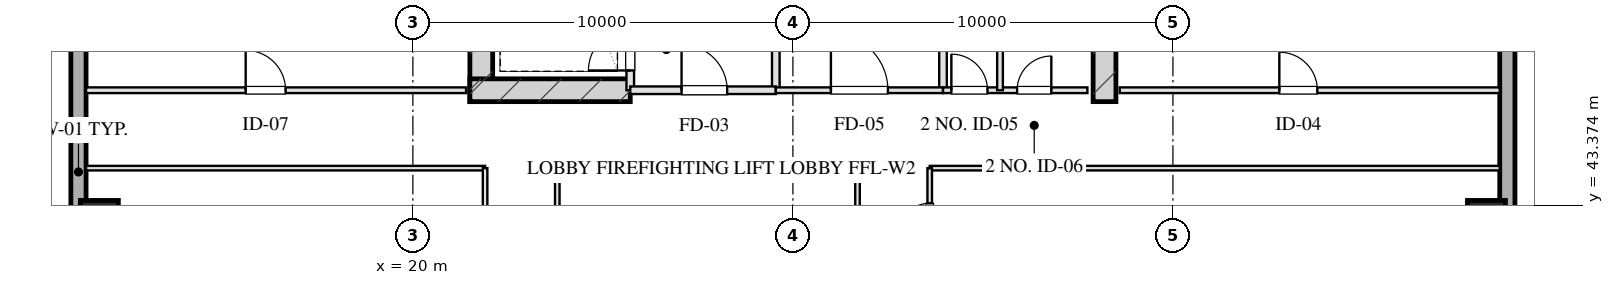
"""IFC4 building model, lengths in metres.
Left out: names, types, materials, properties, quantities, classifications, styles, units other than length and angle.
Written with IfcOpenShell. Run it as: python <this file> out.ifc"""

import sys

from ifc_helpers import new_model, si_unit, direction, frame, frame_2d, origin, origin_2d, place, context, subcontext, project, spatial, rectangle, hollow_rectangle, extrude, element, fill, save


model = new_model("IFC4")
c1 = context("Model", 3, precision=1e-05, world=origin(), true_north=direction((0.0, 1.0)))
c2 = subcontext(c1, "Body", "Model", "MODEL_VIEW")
j1 = project(units=[si_unit("LENGTHUNIT", "METRE"), si_unit("PLANEANGLEUNIT", "RADIAN")], contexts=[c1])
p1 = place(None, origin())
s1 = spatial("IfcSite", under=j1, at=p1, CompositionType="ELEMENT")
p2 = place(p1, origin())
s2 = spatial("IfcBuilding", under=s1, at=p2, CompositionType="ELEMENT")
p3 = place(p2, frame((0.0, 0.0, 124.2)))
s3 = spatial("IfcBuildingStorey", under=s2, at=p3, CompositionType="ELEMENT", Elevation=124.2)
for number, where, z_axis, x_axis in (
    (1, (21.8, 46.1, 0.0), (0.0, 0.0, 1.0), (0.0, 1.0, 0.0)),
    (2, (38.2, 46.1, 0.0), (0.0, 0.0, 1.0), (0.0, 1.0, 0.0)),
):
    element("IfcWall", number, at=place(p3, frame(where, z_axis=z_axis, x_axis=x_axis)), inside=s3, PredefinedType="SHEAR", context=c2, shape_type="SweptSolid", body=[
        extrude(rectangle(XDim=9.48, YDim=0.6, at=frame_2d((4.74, 0.0))), origin(), (0.0, 0.0, 1.0), 3.45),
    ])
p4 = place(p3, frame((21.5, 46.4, 0.0), z_axis=(0.0, 0.0, 1.0), x_axis=(1.0, 0.0, 0.0)))
e3 = element("IfcWall", 3, at=p4, inside=s3, PredefinedType="SHEAR", context=c2, shape_type="SweptSolid", body=[
    extrude(rectangle(XDim=4.22, YDim=0.6, at=frame_2d((2.11, 0.0))), origin(), (0.0, 0.0, 1.0), 3.45),
])
for number, where, z_axis, x_axis in (
    (4, (11.75, 43.0, 0.0), (0.0, 0.0, 1.0), (1.0, 0.0, 0.0)),
    (5, (48.25, 43.0, 0.0), (0.0, 0.0, 1.0), (1.0, 0.0, 0.0)),
):
    element("IfcColumn", number, at=place(p3, frame(where, z_axis=z_axis, x_axis=x_axis)), inside=s3, PredefinedType="COLUMN", context=c2, shape_type="SweptSolid", body=[
        extrude(hollow_rectangle(XDim=1.0, YDim=1.0, WallThickness=0.036, at=origin_2d()), origin(), (0.0, 0.0, 1.0), 3.451),
    ])
p5 = place(p3, frame((11.2, 9.0, 0.0), z_axis=(0.0, 0.0, 1.0), x_axis=(0.0, 1.0, 0.0)))
e6 = element("IfcWall", 6, at=p5, inside=s3, PredefinedType="SOLIDWALL", context=c2, shape_type="SweptSolid", body=[
    extrude(rectangle(XDim=50.0, YDim=0.4, at=frame_2d((25.0, 0.0))), origin(), (0.0, 0.0, 1.0), 2.61),
])
p6 = place(p5, frame((30.2, 0.0, 0.75)))
e7 = element("IfcOpeningElement", 7, at=p6, cuts=e6, PredefinedType="OPENING", context=c2, shape_type="SweptSolid", body=[
    extrude(rectangle(XDim=2.4, YDim=1.46, at=frame_2d((1.2, 0.73))), frame((0.0, 0.21, 0.0), z_axis=(0.0, -1.0, 0.0), x_axis=(1.0, 0.0, 0.0)), (0.0, 0.0, 1.0), 0.42),
])
p7 = place(p5, frame((18.65, 0.0, 0.0)))
e8 = element("IfcOpeningElement", 8, at=p7, cuts=e6, PredefinedType="OPENING", context=c2, shape_type="SweptSolid", body=[
    extrude(rectangle(XDim=1.1, YDim=2.15, at=frame_2d((0.55, 1.075))), frame((0.0, 0.21, 0.0), z_axis=(0.0, -1.0, 0.0), x_axis=(1.0, 0.0, 0.0)), (0.0, 0.0, 1.0), 0.42),
])
p8 = place(p3, frame((48.8, 59.0, 0.0), z_axis=(0.0, 0.0, 1.0), x_axis=(0.0, -1.0, 0.0)))
e9 = element("IfcWall", 9, at=p8, inside=s3, PredefinedType="SOLIDWALL", context=c2, shape_type="SweptSolid", body=[
    extrude(rectangle(XDim=50.0, YDim=0.4, at=frame_2d((25.0, 0.0))), origin(), (0.0, 0.0, 1.0), 2.61),
])
p9 = place(p8, frame((21.2, 0.0, 0.75)))
e10 = element("IfcOpeningElement", 10, at=p9, cuts=e9, PredefinedType="OPENING", context=c2, shape_type="SweptSolid", body=[
    extrude(rectangle(XDim=2.4, YDim=1.46, at=frame_2d((1.2, 0.73))), frame((0.0, 0.21, 0.0), z_axis=(0.0, -1.0, 0.0), x_axis=(1.0, 0.0, 0.0)), (0.0, 0.0, 1.0), 0.42),
])
p10 = place(p8, frame((30.25, 0.0, 0.0)))
e11 = element("IfcOpeningElement", 11, at=p10, cuts=e9, PredefinedType="OPENING", context=c2, shape_type="SweptSolid", body=[
    extrude(rectangle(XDim=1.1, YDim=2.15, at=frame_2d((0.55, 1.075))), frame((0.0, 0.21, 0.0), z_axis=(0.0, -1.0, 0.0), x_axis=(1.0, 0.0, 0.0)), (0.0, 0.0, 1.0), 0.42),
])
p11 = place(p3, frame((25.72, 46.4, 0.0), z_axis=(0.0, 0.0, 1.0), x_axis=(0.0, 1.0, 0.0)))
e12 = element("IfcWall", 12, at=p11, inside=s3, PredefinedType="PARTITIONING", context=c2, shape_type="SweptSolid", body=[
    extrude(rectangle(XDim=1.9, YDim=0.2, at=frame_2d((0.95, 0.0))), origin(), (0.0, 0.0, 1.0), 3.175),
])
p12 = place(p11, frame((0.52, 0.0, 0.0)))
e13 = element("IfcOpeningElement", 13, at=p12, cuts=e12, PredefinedType="OPENING", context=c2, shape_type="SweptSolid", body=[
    extrude(rectangle(XDim=1.1, YDim=2.05, at=frame_2d((0.55, 1.025))), frame((0.0, 0.11, 0.0), z_axis=(0.0, -1.0, 0.0), x_axis=(1.0, 0.0, 0.0)), (0.0, 0.0, 1.0), 0.22),
])
p13 = place(p3, frame((29.55, 46.4, 0.0), z_axis=(0.0, 0.0, 1.0), x_axis=(0.0, 1.0, 0.0)))
e14 = element("IfcWall", 14, at=p13, inside=s3, PredefinedType="PARTITIONING", context=c2, shape_type="SweptSolid", body=[
    extrude(rectangle(XDim=8.43, YDim=0.2, at=frame_2d((4.215, 0.0))), origin(), (0.0, 0.0, 1.0), 3.175),
])
p14 = place(p3, frame((25.72, 46.4, 0.0), z_axis=(0.0, 0.0, 1.0), x_axis=(1.0, 0.0, 0.0)))
e15 = element("IfcWall", 15, at=p14, inside=s3, PredefinedType="PARTITIONING", context=c2, shape_type="SweptSolid", body=[
    extrude(rectangle(XDim=3.83, YDim=0.2, at=frame_2d((1.915, 0.0))), origin(), (0.0, 0.0, 1.0), 3.175),
])
p15 = place(p14, frame((1.35, 0.0, 0.0)))
e16 = element("IfcOpeningElement", 16, at=p15, cuts=e15, PredefinedType="OPENING", context=c2, shape_type="SweptSolid", body=[
    extrude(rectangle(XDim=1.2, YDim=2.05, at=frame_2d((0.6, 1.025))), frame((0.0, 0.11, 0.0), z_axis=(0.0, -1.0, 0.0), x_axis=(1.0, 0.0, 0.0)), (0.0, 0.0, 1.0), 0.22),
])
p16 = place(p3, frame((33.95, 46.4, 0.0), z_axis=(0.0, 0.0, 1.0), x_axis=(0.0, 1.0, 0.0)))
e17 = element("IfcWall", 17, at=p16, inside=s3, PredefinedType="PARTITIONING", context=c2, shape_type="SweptSolid", body=[
    extrude(rectangle(XDim=8.43, YDim=0.2, at=frame_2d((4.215, 0.0))), origin(), (0.0, 0.0, 1.0), 3.175),
])
p17 = place(p3, frame((29.55, 46.4, 0.0), z_axis=(0.0, 0.0, 1.0), x_axis=(1.0, 0.0, 0.0)))
e18 = element("IfcWall", 18, at=p17, inside=s3, PredefinedType="PARTITIONING", context=c2, shape_type="SweptSolid", body=[
    extrude(rectangle(XDim=4.4, YDim=0.15, at=frame_2d((2.2, 0.0))), origin(), (0.0, 0.0, 1.0), 3.175),
])
p18 = place(p17, frame((1.45, 0.0, 0.0)))
e19 = element("IfcOpeningElement", 19, at=p18, cuts=e18, PredefinedType="OPENING", context=c2, shape_type="SweptSolid", body=[
    extrude(rectangle(XDim=1.5, YDim=2.05, at=frame_2d((0.75, 1.025))), frame((0.0, 0.085, 0.0), z_axis=(0.0, -1.0, 0.0), x_axis=(1.0, 0.0, 0.0)), (0.0, 0.0, 1.0), 0.17),
])
p19 = place(p3, frame((33.95, 46.4, 0.0), z_axis=(0.0, 0.0, 1.0), x_axis=(1.0, 0.0, 0.0)))
e20 = element("IfcWall", 20, at=p19, inside=s3, PredefinedType="PARTITIONING", context=c2, shape_type="SweptSolid", body=[
    extrude(rectangle(XDim=3.8, YDim=0.15, at=frame_2d((1.9, 0.0))), origin(), (0.0, 0.0, 1.0), 3.175),
])
p20 = place(p19, frame((0.22, 0.0, 0.0)))
e21 = element("IfcOpeningElement", 21, at=p20, cuts=e20, PredefinedType="OPENING", context=c2, shape_type="SweptSolid", body=[
    extrude(rectangle(XDim=0.95, YDim=2.05, at=frame_2d((0.475, 1.025))), frame((0.0, 0.085, 0.0), z_axis=(0.0, -1.0, 0.0), x_axis=(1.0, 0.0, 0.0)), (0.0, 0.0, 1.0), 0.17),
])
p21 = place(p19, frame((1.95, 0.0, 0.0)))
e22 = element("IfcOpeningElement", 22, at=p21, cuts=e20, PredefinedType="OPENING", context=c2, shape_type="SweptSolid", body=[
    extrude(rectangle(XDim=0.9, YDim=2.05, at=frame_2d((0.45, 1.025))), frame((0.0, 0.085, 0.0), z_axis=(0.0, -1.0, 0.0), x_axis=(1.0, 0.0, 0.0)), (0.0, 0.0, 1.0), 0.17),
])
p22 = place(p3, frame((35.45, 46.4, 0.0), z_axis=(0.0, 0.0, 1.0), x_axis=(0.0, 1.0, 0.0)))
e23 = element("IfcWall", 23, at=p22, inside=s3, PredefinedType="PARTITIONING", context=c2, shape_type="SweptSolid", body=[
    extrude(rectangle(XDim=8.43, YDim=0.15, at=frame_2d((4.215, 0.0))), origin(), (0.0, 0.0, 1.0), 2.765),
])
p23 = place(p22, frame((2.55, 0.0, 0.0)))
e24 = element("IfcOpeningElement", 24, at=p23, cuts=e23, PredefinedType="OPENING", context=c2, shape_type="SweptSolid", body=[
    extrude(rectangle(XDim=0.95, YDim=2.05, at=frame_2d((0.475, 1.025))), frame((0.0, 0.085, 0.0), z_axis=(0.0, -1.0, 0.0), x_axis=(1.0, 0.0, 0.0)), (0.0, 0.0, 1.0), 0.17),
])
p24 = place(p22, frame((5.6, 0.0, 0.0)))
e25 = element("IfcOpeningElement", 25, at=p24, cuts=e23, PredefinedType="OPENING", context=c2, shape_type="SweptSolid", body=[
    extrude(rectangle(XDim=0.9, YDim=2.05, at=frame_2d((0.45, 1.025))), frame((0.0, 0.085, 0.0), z_axis=(0.0, -1.0, 0.0), x_axis=(1.0, 0.0, 0.0)), (0.0, 0.0, 1.0), 0.17),
])
p25 = place(p3, frame((11.4, 46.4, 0.0), z_axis=(0.0, 0.0, 1.0), x_axis=(1.0, 0.0, 0.0)))
e26 = element("IfcWall", 26, at=p25, inside=s3, PredefinedType="PARTITIONING", context=c2, shape_type="SweptSolid", body=[
    extrude(rectangle(XDim=10.0, YDim=0.15, at=frame_2d((5.0, 0.0))), origin(), (0.0, 0.0, 1.0), 3.175),
])
p26 = place(p25, frame((4.2, 0.0, 0.0)))
e27 = element("IfcOpeningElement", 27, at=p26, cuts=e26, PredefinedType="OPENING", context=c2, shape_type="SweptSolid", body=[
    extrude(rectangle(XDim=1.05, YDim=2.05, at=frame_2d((0.525, 1.025))), frame((0.0, 0.085, 0.0), z_axis=(0.0, -1.0, 0.0), x_axis=(1.0, 0.0, 0.0)), (0.0, 0.0, 1.0), 0.17),
])
p27 = place(p3, frame((38.6, 46.4, 0.0), z_axis=(0.0, 0.0, 1.0), x_axis=(1.0, 0.0, 0.0)))
e28 = element("IfcWall", 28, at=p27, inside=s3, PredefinedType="PARTITIONING", context=c2, shape_type="SweptSolid", body=[
    extrude(rectangle(XDim=10.0, YDim=0.15, at=frame_2d((5.0, 0.0))), origin(), (0.0, 0.0, 1.0), 3.175),
])
p28 = place(p27, frame((4.2, 0.0, 0.0)))
e29 = element("IfcOpeningElement", 29, at=p28, cuts=e28, PredefinedType="OPENING", context=c2, shape_type="SweptSolid", body=[
    extrude(rectangle(XDim=1.0, YDim=2.05, at=frame_2d((0.5, 1.025))), frame((0.0, 0.085, 0.0), z_axis=(0.0, -1.0, 0.0), x_axis=(1.0, 0.0, 0.0)), (0.0, 0.0, 1.0), 0.17),
])
p29 = place(p3, frame((11.4, 44.35, 0.0), z_axis=(0.0, 0.0, 1.0), x_axis=(1.0, 0.0, 0.0)))
e30 = element("IfcWall", 30, at=p29, inside=s3, PredefinedType="PARTITIONING", context=c2, shape_type="SweptSolid", body=[
    extrude(rectangle(XDim=10.5, YDim=0.12, at=frame_2d((5.25, 0.0))), origin(), (0.0, 0.0, 1.0), 3.175),
])
p30 = place(p3, frame((23.8, 44.35, 0.0), z_axis=(0.0, 0.0, 1.0), x_axis=(1.0, 0.0, 0.0)))
e31 = element("IfcWall", 31, at=p30, inside=s3, PredefinedType="PARTITIONING", context=c2, shape_type="SweptSolid", body=[
    extrude(rectangle(XDim=7.9, YDim=0.12, at=frame_2d((3.95, 0.0))), origin(), (0.0, 0.0, 1.0), 3.175),
])
p31 = place(p3, frame((33.6, 44.35, 0.0), z_axis=(0.0, 0.0, 1.0), x_axis=(1.0, 0.0, 0.0)))
e32 = element("IfcWall", 32, at=p31, inside=s3, PredefinedType="PARTITIONING", context=c2, shape_type="SweptSolid", body=[
    extrude(rectangle(XDim=15.0, YDim=0.12, at=frame_2d((7.5, 0.0))), origin(), (0.0, 0.0, 1.0), 3.175),
])
p32 = place(p3, frame((21.9, 23.65, 0.0), z_axis=(0.0, 0.0, 1.0), x_axis=(0.0, 1.0, 0.0)))
e33 = element("IfcWall", 33, at=p32, inside=s3, PredefinedType="PARTITIONING", context=c2, shape_type="SweptSolid", body=[
    extrude(rectangle(XDim=20.7, YDim=0.12, at=frame_2d((10.35, 0.0))), origin(), (0.0, 0.0, 1.0), 3.175),
])
p33 = place(p32, frame((2.675, 0.0, 0.0)))
e34 = element("IfcOpeningElement", 34, at=p33, cuts=e33, PredefinedType="OPENING", context=c2, shape_type="SweptSolid", body=[
    extrude(rectangle(XDim=0.85, YDim=2.05, at=frame_2d((0.425, 1.025))), frame((0.0, 0.07, 0.0), z_axis=(0.0, -1.0, 0.0), x_axis=(1.0, 0.0, 0.0)), (0.0, 0.0, 1.0), 0.14),
])
p34 = place(p32, frame((9.85, 0.0, 0.0)))
e35 = element("IfcOpeningElement", 35, at=p34, cuts=e33, PredefinedType="OPENING", context=c2, shape_type="SweptSolid", body=[
    extrude(rectangle(XDim=1.0, YDim=2.05, at=frame_2d((0.5, 1.025))), frame((0.0, 0.07, 0.0), z_axis=(0.0, -1.0, 0.0), x_axis=(1.0, 0.0, 0.0)), (0.0, 0.0, 1.0), 0.14),
])
p35 = place(p32, frame((17.025, 0.0, 0.0)))
e36 = element("IfcOpeningElement", 36, at=p35, cuts=e33, PredefinedType="OPENING", context=c2, shape_type="SweptSolid", body=[
    extrude(rectangle(XDim=1.0, YDim=2.05, at=frame_2d((0.5, 1.025))), frame((0.0, 0.07, 0.0), z_axis=(0.0, -1.0, 0.0), x_axis=(1.0, 0.0, 0.0)), (0.0, 0.0, 1.0), 0.14),
])
p36 = place(p3, frame((23.8, 23.65, 0.0), z_axis=(0.0, 0.0, 1.0), x_axis=(0.0, 1.0, 0.0)))
e37 = element("IfcWall", 37, at=p36, inside=s3, PredefinedType="PARTITIONING", context=c2, shape_type="SweptSolid", body=[
    extrude(rectangle(XDim=20.7, YDim=0.12, at=frame_2d((10.35, 0.0))), origin(), (0.0, 0.0, 1.0), 3.175),
])
p37 = place(p36, frame((2.857, 0.0, 0.0)))
e38 = element("IfcOpeningElement", 38, at=p37, cuts=e37, PredefinedType="OPENING", context=c2, shape_type="SweptSolid", body=[
    extrude(rectangle(XDim=1.1, YDim=2.05, at=frame_2d((0.55, 1.025))), frame((0.0, 0.07, 0.0), z_axis=(0.0, -1.0, 0.0), x_axis=(1.0, 0.0, 0.0)), (0.0, 0.0, 1.0), 0.14),
])
p38 = place(p36, frame((17.189, 0.0, 0.0)))
e39 = element("IfcOpeningElement", 39, at=p38, cuts=e37, PredefinedType="OPENING", context=c2, shape_type="SweptSolid", body=[
    extrude(rectangle(XDim=1.1, YDim=2.05, at=frame_2d((0.55, 1.025))), frame((0.0, 0.07, 0.0), z_axis=(0.0, -1.0, 0.0), x_axis=(1.0, 0.0, 0.0)), (0.0, 0.0, 1.0), 0.14),
])
p39 = place(p3, frame((31.7, 23.65, 0.0), z_axis=(0.0, 0.0, 1.0), x_axis=(0.0, 1.0, 0.0)))
e40 = element("IfcWall", 40, at=p39, inside=s3, PredefinedType="PARTITIONING", context=c2, shape_type="SweptSolid", body=[
    extrude(rectangle(XDim=20.7, YDim=0.12, at=frame_2d((10.35, 0.0))), origin(), (0.0, 0.0, 1.0), 3.175),
])
p40 = place(p39, frame((9.696, 0.0, 0.0)))
e41 = element("IfcOpeningElement", 41, at=p40, cuts=e40, PredefinedType="OPENING", context=c2, shape_type="SweptSolid", body=[
    extrude(rectangle(XDim=1.1, YDim=2.05, at=frame_2d((0.55, 1.025))), frame((0.0, 0.07, 0.0), z_axis=(0.0, -1.0, 0.0), x_axis=(1.0, 0.0, 0.0)), (0.0, 0.0, 1.0), 0.14),
])
p41 = place(p3, frame((33.6, 23.65, 0.0), z_axis=(0.0, 0.0, 1.0), x_axis=(0.0, 1.0, 0.0)))
e42 = element("IfcWall", 42, at=p41, inside=s3, PredefinedType="PARTITIONING", context=c2, shape_type="SweptSolid", body=[
    extrude(rectangle(XDim=20.7, YDim=0.12, at=frame_2d((10.35, 0.0))), origin(), (0.0, 0.0, 1.0), 3.175),
])
p42 = place(p41, frame((0.775, 0.0, 0.0)))
e43 = element("IfcOpeningElement", 43, at=p42, cuts=e42, PredefinedType="OPENING", context=c2, shape_type="SweptSolid", body=[
    extrude(rectangle(XDim=1.0, YDim=2.05, at=frame_2d((0.5, 1.025))), frame((0.0, 0.07, 0.0), z_axis=(0.0, -1.0, 0.0), x_axis=(1.0, 0.0, 0.0)), (0.0, 0.0, 1.0), 0.14),
])
p43 = place(p41, frame((3.95, 0.0, 0.0)))
e44 = element("IfcOpeningElement", 44, at=p43, cuts=e42, PredefinedType="OPENING", context=c2, shape_type="SweptSolid", body=[
    extrude(rectangle(XDim=1.0, YDim=2.05, at=frame_2d((0.5, 1.025))), frame((0.0, 0.07, 0.0), z_axis=(0.0, -1.0, 0.0), x_axis=(1.0, 0.0, 0.0)), (0.0, 0.0, 1.0), 0.14),
])
p44 = place(p41, frame((8.19, 0.0, 0.0)))
e45 = element("IfcOpeningElement", 45, at=p44, cuts=e42, PredefinedType="OPENING", context=c2, shape_type="SweptSolid", body=[
    extrude(rectangle(XDim=1.0, YDim=2.05, at=frame_2d((0.5, 1.025))), frame((0.0, 0.07, 0.0), z_axis=(0.0, -1.0, 0.0), x_axis=(1.0, 0.0, 0.0)), (0.0, 0.0, 1.0), 0.14),
])
p45 = place(p41, frame((12.257, 0.0, 0.0)))
e46 = element("IfcOpeningElement", 46, at=p45, cuts=e42, PredefinedType="OPENING", context=c2, shape_type="SweptSolid", body=[
    extrude(rectangle(XDim=1.0, YDim=2.05, at=frame_2d((0.5, 1.025))), frame((0.0, 0.07, 0.0), z_axis=(0.0, -1.0, 0.0), x_axis=(1.0, 0.0, 0.0)), (0.0, 0.0, 1.0), 0.14),
])
p46 = place(p41, frame((15.816, 0.0, 0.0)))
e47 = element("IfcOpeningElement", 47, at=p46, cuts=e42, PredefinedType="OPENING", context=c2, shape_type="SweptSolid", body=[
    extrude(rectangle(XDim=1.0, YDim=2.05, at=frame_2d((0.5, 1.025))), frame((0.0, 0.07, 0.0), z_axis=(0.0, -1.0, 0.0), x_axis=(1.0, 0.0, 0.0)), (0.0, 0.0, 1.0), 0.14),
])
p47 = place(p41, frame((18.925, 0.0, 0.0)))
e48 = element("IfcOpeningElement", 48, at=p47, cuts=e42, PredefinedType="OPENING", context=c2, shape_type="SweptSolid", body=[
    extrude(rectangle(XDim=0.85, YDim=2.05, at=frame_2d((0.425, 1.025))), frame((0.0, 0.07, 0.0), z_axis=(0.0, -1.0, 0.0), x_axis=(1.0, 0.0, 0.0)), (0.0, 0.0, 1.0), 0.14),
])
p48 = place(p12, origin())
e49 = element("IfcDoor", 49, at=p48, inside=s3, OperationType="SINGLE_SWING_LEFT", PredefinedType="DOOR", context=c2, shape_type="SweptSolid", body=[
    extrude(rectangle(XDim=1.1, YDim=2.05, at=frame_2d((0.55, 1.025))), frame((0.0, 0.025, 0.0), z_axis=(0.0, -1.0, 0.0), x_axis=(1.0, 0.0, 0.0)), (0.0, 0.0, 1.0), 0.05),
])
fill(e13, e49)
p49 = place(p15, origin())
e50 = element("IfcDoor", 50, at=p49, inside=s3, OperationType="SINGLE_SWING_LEFT", PredefinedType="DOOR", context=c2, shape_type="SweptSolid", body=[
    extrude(rectangle(XDim=1.2, YDim=2.05, at=frame_2d((0.6, 1.025))), frame((0.0, 0.025, 0.0), z_axis=(0.0, -1.0, 0.0), x_axis=(1.0, 0.0, 0.0)), (0.0, 0.0, 1.0), 0.05),
])
fill(e16, e50)
p50 = place(p18, origin())
e51 = element("IfcDoor", 51, at=p50, inside=s3, OperationType="SINGLE_SWING_LEFT", PredefinedType="DOOR", context=c2, shape_type="SweptSolid", body=[
    extrude(rectangle(XDim=1.5, YDim=2.05, at=frame_2d((0.75, 1.025))), frame((0.0, 0.025, 0.0), z_axis=(0.0, -1.0, 0.0), x_axis=(1.0, 0.0, 0.0)), (0.0, 0.0, 1.0), 0.05),
])
fill(e19, e51)
p51 = place(p20, origin())
e52 = element("IfcDoor", 52, at=p51, inside=s3, OperationType="SINGLE_SWING_LEFT", PredefinedType="DOOR", context=c2, shape_type="SweptSolid", body=[
    extrude(rectangle(XDim=0.95, YDim=2.05, at=frame_2d((0.475, 1.025))), frame((0.0, 0.025, 0.0), z_axis=(0.0, -1.0, 0.0), x_axis=(1.0, 0.0, 0.0)), (0.0, 0.0, 1.0), 0.05),
])
fill(e21, e52)
p52 = place(p21, origin())
e53 = element("IfcDoor", 53, at=p52, inside=s3, OperationType="SINGLE_SWING_RIGHT", PredefinedType="DOOR", context=c2, shape_type="SweptSolid", body=[
    extrude(rectangle(XDim=0.9, YDim=2.05, at=frame_2d((0.45, 1.025))), frame((0.0, 0.025, 0.0), z_axis=(0.0, -1.0, 0.0), x_axis=(1.0, 0.0, 0.0)), (0.0, 0.0, 1.0), 0.05),
])
fill(e22, e53)
p53 = place(p26, origin())
e54 = element("IfcDoor", 54, at=p53, inside=s3, OperationType="SINGLE_SWING_LEFT", PredefinedType="DOOR", context=c2, shape_type="SweptSolid", body=[
    extrude(rectangle(XDim=1.05, YDim=2.05, at=frame_2d((0.525, 1.025))), frame((0.0, 0.025, 0.0), z_axis=(0.0, -1.0, 0.0), x_axis=(1.0, 0.0, 0.0)), (0.0, 0.0, 1.0), 0.05),
])
fill(e27, e54)
p54 = place(p28, origin())
e55 = element("IfcDoor", 55, at=p54, inside=s3, OperationType="SINGLE_SWING_LEFT", PredefinedType="DOOR", context=c2, shape_type="SweptSolid", body=[
    extrude(rectangle(XDim=1.0, YDim=2.05, at=frame_2d((0.5, 1.025))), frame((0.0, 0.025, 0.0), z_axis=(0.0, -1.0, 0.0), x_axis=(1.0, 0.0, 0.0)), (0.0, 0.0, 1.0), 0.05),
])
fill(e29, e55)
p55 = place(p47, origin())
e56 = element("IfcDoor", 56, at=p55, inside=s3, OperationType="SINGLE_SWING_LEFT", PredefinedType="DOOR", context=c2, shape_type="SweptSolid", body=[
    extrude(rectangle(XDim=0.85, YDim=2.05, at=frame_2d((0.425, 1.025))), frame((0.0, 0.025, 0.0), z_axis=(0.0, -1.0, 0.0), x_axis=(1.0, 0.0, 0.0)), (0.0, 0.0, 1.0), 0.05),
])
fill(e48, e56)
save(model, sys.argv[1])
